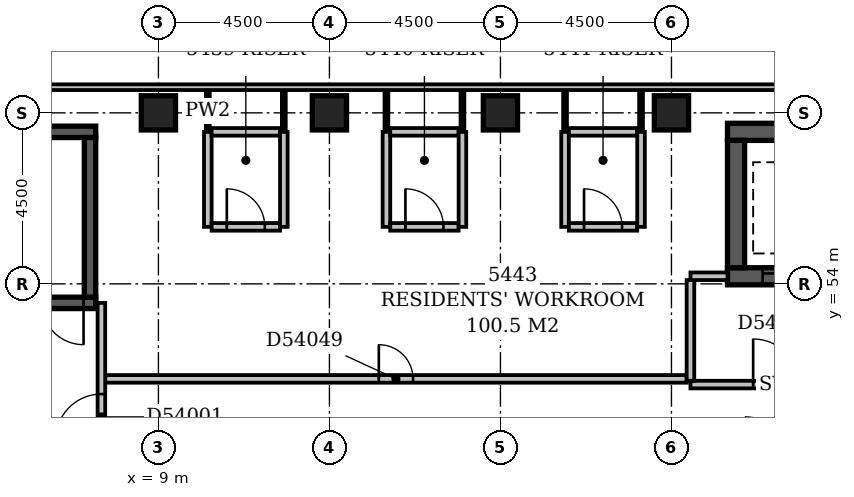
"""IFC4 building model, lengths in metres.
Left out: names, types, materials, properties, quantities, classifications, styles, units other than length and angle.
Written with IfcOpenShell. Run it as: python <this file> out.ifc"""

import sys

from ifc_helpers import new_model, si_unit, direction, frame, frame_2d, origin, origin_2d, place, context, subcontext, project, spatial, rectangle, extrude, element, fill, save


model = new_model("IFC4")
c1 = context("Model", 3, precision=1e-05, world=origin(), true_north=direction((0.0, 1.0)))
c2 = subcontext(c1, "Body", "Model", "MODEL_VIEW")
j1 = project(units=[si_unit("LENGTHUNIT", "METRE"), si_unit("PLANEANGLEUNIT", "RADIAN")], contexts=[c1])
p1 = place(None, origin())
s1 = spatial("IfcSite", under=j1, at=p1, CompositionType="ELEMENT")
p2 = place(p1, origin())
s2 = spatial("IfcBuilding", under=s1, at=p2, CompositionType="ELEMENT")
p3 = place(p2, frame((0.0, 0.0, 211.4)))
s3 = spatial("IfcBuildingStorey", under=s2, at=p3, CompositionType="ELEMENT", Elevation=211.4)
p4 = place(p3, frame((0.35, 53.5, -0.35), z_axis=(0.0, 0.0, 1.0), x_axis=(1.0, 0.0, 0.0)))
e1 = element("IfcWall", 1, at=p4, inside=s3, PredefinedType="SHEAR", context=c2, shape_type="SweptSolid", body=[
    extrude(rectangle(XDim=7.0, YDim=0.3, at=frame_2d((3.5, 0.0))), origin(), (0.0, 0.0, 1.0), 3.65),
])
p5 = place(p4, frame((5.58, 0.0, 0.35)))
e2 = element("IfcOpeningElement", 2, at=p5, cuts=e1, PredefinedType="OPENING", context=c2, shape_type="SweptSolid", body=[
    extrude(rectangle(XDim=1.1, YDim=2.1, at=frame_2d((0.55, 1.05))), frame((0.0, 0.162, 0.0), z_axis=(0.0, -1.0, 0.0), x_axis=(1.0, 0.0, 0.0)), (0.0, 0.0, 1.0), 0.324),
])
p6 = place(p3, frame((0.35, 58.0, -0.35), z_axis=(0.0, 0.0, 1.0), x_axis=(1.0, 0.0, 0.0)))
e3 = element("IfcWall", 3, at=p6, inside=s3, PredefinedType="SHEAR", context=c2, shape_type="SweptSolid", body=[
    extrude(rectangle(XDim=7.0, YDim=0.3, at=frame_2d((3.5, 0.0))), origin(), (0.0, 0.0, 1.0), 3.65),
])
p7 = place(p3, frame((7.2, 53.65, -0.35), z_axis=(0.0, 0.0, 1.0), x_axis=(0.0, 1.0, 0.0)))
e4 = element("IfcWall", 4, at=p7, inside=s3, PredefinedType="SHEAR", context=c2, shape_type="SweptSolid", body=[
    extrude(rectangle(XDim=4.2, YDim=0.3, at=frame_2d((2.1, 0.0))), origin(), (0.0, 0.0, 1.0), 3.65),
])
p8 = place(p3, frame((23.975, 54.2, -0.35), z_axis=(0.0, 0.0, 1.0), x_axis=(1.0, 0.0, 0.0)))
e5 = element("IfcWall", 5, at=p8, inside=s3, PredefinedType="SHEAR", context=c2, shape_type="SweptSolid", body=[
    extrude(rectangle(XDim=2.95, YDim=0.45, at=frame_2d((1.475, 0.0))), origin(), (0.0, 0.0, 1.0), 3.65),
])
p9 = place(p8, frame((0.925, 0.0, 0.35)))
e6 = element("IfcOpeningElement", 6, at=p9, cuts=e5, PredefinedType="OPENING", context=c2, shape_type="SweptSolid", body=[
    extrude(rectangle(XDim=1.1, YDim=2.1, at=frame_2d((0.55, 1.05))), frame((0.0, 0.237, 0.0), z_axis=(0.0, -1.0, 0.0), x_axis=(1.0, 0.0, 0.0)), (0.0, 0.0, 1.0), 0.474),
])
p10 = place(p3, frame((23.975, 58.0, -0.35), z_axis=(0.0, 0.0, 1.0), x_axis=(1.0, 0.0, 0.0)))
e7 = element("IfcWall", 7, at=p10, inside=s3, PredefinedType="SHEAR", context=c2, shape_type="SweptSolid", body=[
    extrude(rectangle(XDim=2.95, YDim=0.45, at=frame_2d((1.475, 0.0))), origin(), (0.0, 0.0, 1.0), 3.65),
])
p11 = place(p3, frame((24.2, 54.425, -0.35), z_axis=(0.0, 0.0, 1.0), x_axis=(0.0, 1.0, 0.0)))
e8 = element("IfcWall", 8, at=p11, inside=s3, PredefinedType="SHEAR", context=c2, shape_type="SweptSolid", body=[
    extrude(rectangle(XDim=3.35, YDim=0.45, at=frame_2d((1.675, 0.0))), origin(), (0.0, 0.0, 1.0), 3.65),
])
for number, where, z_axis, x_axis in (
    (9, (9.0, 58.5, -0.35), (0.0, 0.0, 1.0), (1.0, 0.0, 0.0)),
    (10, (13.5, 58.5, -0.35), (0.0, 0.0, 1.0), (1.0, 0.0, 0.0)),
    (11, (18.0, 58.5, -0.35), (0.0, 0.0, 1.0), (1.0, 0.0, 0.0)),
    (12, (22.5, 58.5, -0.35), (0.0, 0.0, 1.0), (1.0, 0.0, 0.0)),
):
    element("IfcColumn", number, at=place(p3, frame(where, z_axis=z_axis, x_axis=x_axis)), inside=s3, PredefinedType="COLUMN", context=c2, shape_type="SweptSolid", body=[
        extrude(rectangle(XDim=0.9, YDim=0.9, at=origin_2d()), origin(), (0.0, 0.0, 1.0), 3.65),
    ])
p12 = place(p3, frame((50.1, 59.175, 0.0), z_axis=(0.0, 0.0, 1.0), x_axis=(-1.0, 0.0, 0.0)))
e13 = element("IfcWall", 13, at=p12, inside=s3, PredefinedType="STANDARD", context=c2, shape_type="SweptSolid", body=[
    extrude(rectangle(XDim=50.85, YDim=0.15, at=frame_2d((25.425, 0.0))), origin(), (0.0, 0.0, 1.0), 2.7),
])
p13 = place(p12, frame((19.65, 0.0, 0.6)))
e14 = element("IfcOpeningElement", 14, at=p13, cuts=e13, PredefinedType="OPENING", context=c2, shape_type="SweptSolid", body=[
    extrude(rectangle(XDim=2.4, YDim=1.8, at=frame_2d((1.2, 0.9))), frame((0.0, 0.087, 0.0), z_axis=(0.0, -1.0, 0.0), x_axis=(1.0, 0.0, 0.0)), (0.0, 0.0, 1.0), 0.174),
])
p14 = place(p3, frame((23.0, 51.35, 0.0), z_axis=(0.0, 0.0, 1.0), x_axis=(1.0, 0.0, 0.0)))
e15 = element("IfcWall", 15, at=p14, inside=s3, PredefinedType="PARTITIONING", context=c2, shape_type="SweptSolid", body=[
    extrude(rectangle(XDim=4.8, YDim=0.2, at=frame_2d((2.4, 0.0))), origin(), (0.0, 0.0, 1.0), 3.3),
])
p15 = place(p14, frame((1.65, 0.0, 0.0)))
e16 = element("IfcOpeningElement", 16, at=p15, cuts=e15, PredefinedType="OPENING", context=c2, shape_type="SweptSolid", body=[
    extrude(rectangle(XDim=1.2, YDim=2.1, at=frame_2d((0.6, 1.05))), frame((0.0, 0.112, 0.0), z_axis=(0.0, -1.0, 0.0), x_axis=(1.0, 0.0, 0.0)), (0.0, 0.0, 1.0), 0.224),
])
p16 = place(p3, frame((23.0, 54.2, 0.0), z_axis=(0.0, 0.0, 1.0), x_axis=(1.0, 0.0, 0.0)))
e17 = element("IfcWall", 17, at=p16, inside=s3, PredefinedType="PARTITIONING", context=c2, shape_type="SweptSolid", body=[
    extrude(rectangle(XDim=0.975, YDim=0.2, at=frame_2d((0.488, 0.0))), origin(), (0.0, 0.0, 1.0), 3.3),
])
p17 = place(p3, frame((23.0, 51.45, 0.0), z_axis=(0.0, 0.0, 1.0), x_axis=(0.0, 1.0, 0.0)))
e18 = element("IfcWall", 18, at=p17, inside=s3, PredefinedType="PARTITIONING", context=c2, shape_type="SweptSolid", body=[
    extrude(rectangle(XDim=2.65, YDim=0.2, at=frame_2d((1.325, 0.0))), origin(), (0.0, 0.0, 1.0), 3.3),
])
p18 = place(p3, frame((7.5, 49.6, 0.0), z_axis=(0.0, 0.0, 1.0), x_axis=(0.0, 1.0, 0.0)))
e19 = element("IfcWall", 19, at=p18, inside=s3, PredefinedType="PARTITIONING", context=c2, shape_type="SweptSolid", body=[
    extrude(rectangle(XDim=3.9, YDim=0.2, at=frame_2d((1.95, 0.0))), origin(), (0.0, 0.0, 1.0), 3.3),
])
p19 = place(p18, frame((0.3, 0.0, 0.0)))
e20 = element("IfcOpeningElement", 20, at=p19, cuts=e19, PredefinedType="OPENING", context=c2, shape_type="SweptSolid", body=[
    extrude(rectangle(XDim=1.2, YDim=2.1, at=frame_2d((0.6, 1.05))), frame((0.0, 0.112, 0.0), z_axis=(0.0, -1.0, 0.0), x_axis=(1.0, 0.0, 0.0)), (0.0, 0.0, 1.0), 0.224),
])
p20 = place(p3, frame((7.6, 51.5, 0.0), z_axis=(0.0, 0.0, 1.0), x_axis=(1.0, 0.0, 0.0)))
e21 = element("IfcWall", 21, at=p20, inside=s3, PredefinedType="PARTITIONING", context=c2, shape_type="SweptSolid", body=[
    extrude(rectangle(XDim=15.3, YDim=0.2, at=frame_2d((7.65, 0.0))), origin(), (0.0, 0.0, 1.0), 3.3),
])
p21 = place(p20, frame((7.2, 0.0, 0.0)))
e22 = element("IfcOpeningElement", 22, at=p21, cuts=e21, PredefinedType="OPENING", context=c2, shape_type="SweptSolid", body=[
    extrude(rectangle(XDim=0.9, YDim=2.1, at=frame_2d((0.45, 1.05))), frame((0.0, 0.112, 0.0), z_axis=(0.0, -1.0, 0.0), x_axis=(1.0, 0.0, 0.0)), (0.0, 0.0, 1.0), 0.224),
])
p22 = place(p3, frame((10.3, 55.5, 0.0), z_axis=(0.0, 0.0, 1.0), x_axis=(0.0, 1.0, 0.0)))
e23 = element("IfcWall", 23, at=p22, inside=s3, PredefinedType="PARTITIONING", context=c2, shape_type="SweptSolid", body=[
    extrude(rectangle(XDim=2.5, YDim=0.2, at=frame_2d((1.25, 0.0))), origin(), (0.0, 0.0, 1.0), 3.3),
])
p23 = place(p3, frame((10.4, 55.5, 0.0), z_axis=(0.0, 0.0, 1.0), x_axis=(1.0, 0.0, 0.0)))
e24 = element("IfcWall", 24, at=p23, inside=s3, PredefinedType="PARTITIONING", context=c2, shape_type="SweptSolid", body=[
    extrude(rectangle(XDim=1.8, YDim=0.2, at=frame_2d((0.9, 0.0))), origin(), (0.0, 0.0, 1.0), 3.3),
])
p24 = place(p23, frame((0.4, 0.0, 0.0)))
e25 = element("IfcOpeningElement", 25, at=p24, cuts=e24, PredefinedType="OPENING", context=c2, shape_type="SweptSolid", body=[
    extrude(rectangle(XDim=1.0, YDim=2.1, at=frame_2d((0.5, 1.05))), frame((0.0, 0.112, 0.0), z_axis=(0.0, -1.0, 0.0), x_axis=(1.0, 0.0, 0.0)), (0.0, 0.0, 1.0), 0.224),
])
for number, where, z_axis, x_axis in (
    (26, (12.3, 55.5, 0.0), (0.0, 0.0, 1.0), (0.0, 1.0, 0.0)),
    (27, (15.0, 55.5, 0.0), (0.0, 0.0, 1.0), (0.0, 1.0, 0.0)),
):
    element("IfcWall", number, at=place(p3, frame(where, z_axis=z_axis, x_axis=x_axis)), inside=s3, PredefinedType="PARTITIONING", context=c2, shape_type="SweptSolid", body=[
        extrude(rectangle(XDim=2.5, YDim=0.2, at=frame_2d((1.25, 0.0))), origin(), (0.0, 0.0, 1.0), 3.3),
    ])
p25 = place(p3, frame((15.1, 55.5, 0.0), z_axis=(0.0, 0.0, 1.0), x_axis=(1.0, 0.0, 0.0)))
e28 = element("IfcWall", 28, at=p25, inside=s3, PredefinedType="PARTITIONING", context=c2, shape_type="SweptSolid", body=[
    extrude(rectangle(XDim=1.8, YDim=0.2, at=frame_2d((0.9, 0.0))), origin(), (0.0, 0.0, 1.0), 3.3),
])
p26 = place(p25, frame((0.4, 0.0, 0.0)))
e29 = element("IfcOpeningElement", 29, at=p26, cuts=e28, PredefinedType="OPENING", context=c2, shape_type="SweptSolid", body=[
    extrude(rectangle(XDim=1.0, YDim=2.1, at=frame_2d((0.5, 1.05))), frame((0.0, 0.112, 0.0), z_axis=(0.0, -1.0, 0.0), x_axis=(1.0, 0.0, 0.0)), (0.0, 0.0, 1.0), 0.224),
])
for number, where, z_axis, x_axis in (
    (30, (17.0, 55.5, 0.0), (0.0, 0.0, 1.0), (0.0, 1.0, 0.0)),
    (31, (19.7, 55.5, 0.0), (0.0, 0.0, 1.0), (0.0, 1.0, 0.0)),
):
    element("IfcWall", number, at=place(p3, frame(where, z_axis=z_axis, x_axis=x_axis)), inside=s3, PredefinedType="PARTITIONING", context=c2, shape_type="SweptSolid", body=[
        extrude(rectangle(XDim=2.5, YDim=0.2, at=frame_2d((1.25, 0.0))), origin(), (0.0, 0.0, 1.0), 3.3),
    ])
p27 = place(p3, frame((19.8, 55.5, 0.0), z_axis=(0.0, 0.0, 1.0), x_axis=(1.0, 0.0, 0.0)))
e32 = element("IfcWall", 32, at=p27, inside=s3, PredefinedType="PARTITIONING", context=c2, shape_type="SweptSolid", body=[
    extrude(rectangle(XDim=1.8, YDim=0.2, at=frame_2d((0.9, 0.0))), origin(), (0.0, 0.0, 1.0), 3.3),
])
p28 = place(p27, frame((0.4, 0.0, 0.0)))
e33 = element("IfcOpeningElement", 33, at=p28, cuts=e32, PredefinedType="OPENING", context=c2, shape_type="SweptSolid", body=[
    extrude(rectangle(XDim=1.0, YDim=2.1, at=frame_2d((0.5, 1.05))), frame((0.0, 0.112, 0.0), z_axis=(0.0, -1.0, 0.0), x_axis=(1.0, 0.0, 0.0)), (0.0, 0.0, 1.0), 0.224),
])
p29 = place(p3, frame((21.7, 55.5, 0.0), z_axis=(0.0, 0.0, 1.0), x_axis=(0.0, 1.0, 0.0)))
e34 = element("IfcWall", 34, at=p29, inside=s3, PredefinedType="PARTITIONING", context=c2, shape_type="SweptSolid", body=[
    extrude(rectangle(XDim=2.5, YDim=0.2, at=frame_2d((1.25, 0.0))), origin(), (0.0, 0.0, 1.0), 3.3),
])
p30 = place(p3, frame((10.3, 58.0, 0.0), z_axis=(0.0, 0.0, 1.0), x_axis=(0.0, 1.0, 0.0)))
e35 = element("IfcWall", 35, at=p30, inside=s3, PredefinedType="PARTITIONING", context=c2, shape_type="SweptSolid", body=[
    extrude(rectangle(XDim=1.1, YDim=0.1, at=frame_2d((0.55, 0.0))), origin(), (0.0, 0.0, 1.0), 3.3),
])
p31 = place(p3, frame((10.4, 58.0, 0.0), z_axis=(0.0, 0.0, 1.0), x_axis=(1.0, 0.0, 0.0)))
e36 = element("IfcWall", 36, at=p31, inside=s3, PredefinedType="PARTITIONING", context=c2, shape_type="SweptSolid", body=[
    extrude(rectangle(XDim=1.8, YDim=0.2, at=frame_2d((0.9, 0.0))), origin(), (0.0, 0.0, 1.0), 3.3),
])
for number, where, z_axis, x_axis in (
    (37, (12.3, 58.0, 0.0), (0.0, 0.0, 1.0), (0.0, 1.0, 0.0)),
    (38, (15.0, 58.0, 0.0), (0.0, 0.0, 1.0), (0.0, 1.0, 0.0)),
):
    element("IfcWall", number, at=place(p3, frame(where, z_axis=z_axis, x_axis=x_axis)), inside=s3, PredefinedType="PARTITIONING", context=c2, shape_type="SweptSolid", body=[
        extrude(rectangle(XDim=1.1, YDim=0.1, at=frame_2d((0.55, 0.0))), origin(), (0.0, 0.0, 1.0), 3.3),
    ])
p32 = place(p3, frame((15.1, 58.0, 0.0), z_axis=(0.0, 0.0, 1.0), x_axis=(1.0, 0.0, 0.0)))
e39 = element("IfcWall", 39, at=p32, inside=s3, PredefinedType="PARTITIONING", context=c2, shape_type="SweptSolid", body=[
    extrude(rectangle(XDim=1.8, YDim=0.2, at=frame_2d((0.9, 0.0))), origin(), (0.0, 0.0, 1.0), 3.3),
])
for number, where, z_axis, x_axis in (
    (40, (17.0, 58.0, 0.0), (0.0, 0.0, 1.0), (0.0, 1.0, 0.0)),
    (41, (19.7, 58.0, 0.0), (0.0, 0.0, 1.0), (0.0, 1.0, 0.0)),
):
    element("IfcWall", number, at=place(p3, frame(where, z_axis=z_axis, x_axis=x_axis)), inside=s3, PredefinedType="PARTITIONING", context=c2, shape_type="SweptSolid", body=[
        extrude(rectangle(XDim=1.1, YDim=0.1, at=frame_2d((0.55, 0.0))), origin(), (0.0, 0.0, 1.0), 3.3),
    ])
p33 = place(p3, frame((19.8, 58.0, 0.0), z_axis=(0.0, 0.0, 1.0), x_axis=(1.0, 0.0, 0.0)))
e42 = element("IfcWall", 42, at=p33, inside=s3, PredefinedType="PARTITIONING", context=c2, shape_type="SweptSolid", body=[
    extrude(rectangle(XDim=1.8, YDim=0.2, at=frame_2d((0.9, 0.0))), origin(), (0.0, 0.0, 1.0), 3.3),
])
p34 = place(p3, frame((21.7, 58.0, 0.0), z_axis=(0.0, 0.0, 1.0), x_axis=(0.0, 1.0, 0.0)))
e43 = element("IfcWall", 43, at=p34, inside=s3, PredefinedType="PARTITIONING", context=c2, shape_type="SweptSolid", body=[
    extrude(rectangle(XDim=1.1, YDim=0.1, at=frame_2d((0.55, 0.0))), origin(), (0.0, 0.0, 1.0), 3.3),
])
p35 = place(p19, origin())
e44 = element("IfcDoor", 44, at=p35, inside=s3, OperationType="SINGLE_SWING_LEFT", PredefinedType="DOOR", context=c2, shape_type="SweptSolid", body=[
    extrude(rectangle(XDim=1.2, YDim=2.1, at=frame_2d((0.6, 1.05))), frame((0.0, 0.025, 0.0), z_axis=(0.0, -1.0, 0.0), x_axis=(1.0, 0.0, 0.0)), (0.0, 0.0, 1.0), 0.05),
])
fill(e20, e44)
p36 = place(p15, origin())
e45 = element("IfcDoor", 45, at=p36, inside=s3, OperationType="SINGLE_SWING_LEFT", PredefinedType="DOOR", context=c2, shape_type="SweptSolid", body=[
    extrude(rectangle(XDim=1.2, YDim=2.1, at=frame_2d((0.6, 1.05))), frame((0.0, 0.025, 0.0), z_axis=(0.0, -1.0, 0.0), x_axis=(1.0, 0.0, 0.0)), (0.0, 0.0, 1.0), 0.05),
])
fill(e16, e45)
p37 = place(p9, origin())
e46 = element("IfcDoor", 46, at=p37, inside=s3, OperationType="SLIDING_TO_LEFT", PredefinedType="DOOR", context=c2, shape_type="SweptSolid", body=[
    extrude(rectangle(XDim=1.1, YDim=2.1, at=frame_2d((0.55, 1.05))), frame((0.0, 0.025, 0.0), z_axis=(0.0, -1.0, 0.0), x_axis=(1.0, 0.0, 0.0)), (0.0, 0.0, 1.0), 0.05),
])
fill(e6, e46)
p38 = place(p5, origin())
e47 = element("IfcDoor", 47, at=p38, inside=s3, OperationType="SINGLE_SWING_RIGHT", PredefinedType="DOOR", context=c2, shape_type="SweptSolid", body=[
    extrude(rectangle(XDim=1.1, YDim=2.1, at=frame_2d((0.55, 1.05))), frame((0.0, 0.025, 0.0), z_axis=(0.0, -1.0, 0.0), x_axis=(1.0, 0.0, 0.0)), (0.0, 0.0, 1.0), 0.05),
])
fill(e2, e47)
p39 = place(p21, origin())
e48 = element("IfcDoor", 48, at=p39, inside=s3, OperationType="SINGLE_SWING_LEFT", PredefinedType="DOOR", context=c2, shape_type="SweptSolid", body=[
    extrude(rectangle(XDim=0.9, YDim=2.1, at=frame_2d((0.45, 1.05))), frame((0.0, 0.025, 0.0), z_axis=(0.0, -1.0, 0.0), x_axis=(1.0, 0.0, 0.0)), (0.0, 0.0, 1.0), 0.05),
])
fill(e22, e48)
p40 = place(p24, origin())
e49 = element("IfcDoor", 49, at=p40, inside=s3, OperationType="SINGLE_SWING_LEFT", PredefinedType="DOOR", context=c2, shape_type="SweptSolid", body=[
    extrude(rectangle(XDim=1.0, YDim=2.1, at=frame_2d((0.5, 1.05))), frame((0.0, 0.025, 0.0), z_axis=(0.0, -1.0, 0.0), x_axis=(1.0, 0.0, 0.0)), (0.0, 0.0, 1.0), 0.05),
])
fill(e25, e49)
p41 = place(p26, origin())
e50 = element("IfcDoor", 50, at=p41, inside=s3, OperationType="SINGLE_SWING_LEFT", PredefinedType="DOOR", context=c2, shape_type="SweptSolid", body=[
    extrude(rectangle(XDim=1.0, YDim=2.1, at=frame_2d((0.5, 1.05))), frame((0.0, 0.025, 0.0), z_axis=(0.0, -1.0, 0.0), x_axis=(1.0, 0.0, 0.0)), (0.0, 0.0, 1.0), 0.05),
])
fill(e29, e50)
p42 = place(p28, origin())
e51 = element("IfcDoor", 51, at=p42, inside=s3, OperationType="SINGLE_SWING_LEFT", PredefinedType="DOOR", context=c2, shape_type="SweptSolid", body=[
    extrude(rectangle(XDim=1.0, YDim=2.1, at=frame_2d((0.5, 1.05))), frame((0.0, 0.025, 0.0), z_axis=(0.0, -1.0, 0.0), x_axis=(1.0, 0.0, 0.0)), (0.0, 0.0, 1.0), 0.05),
])
fill(e33, e51)
save(model, sys.argv[1])
